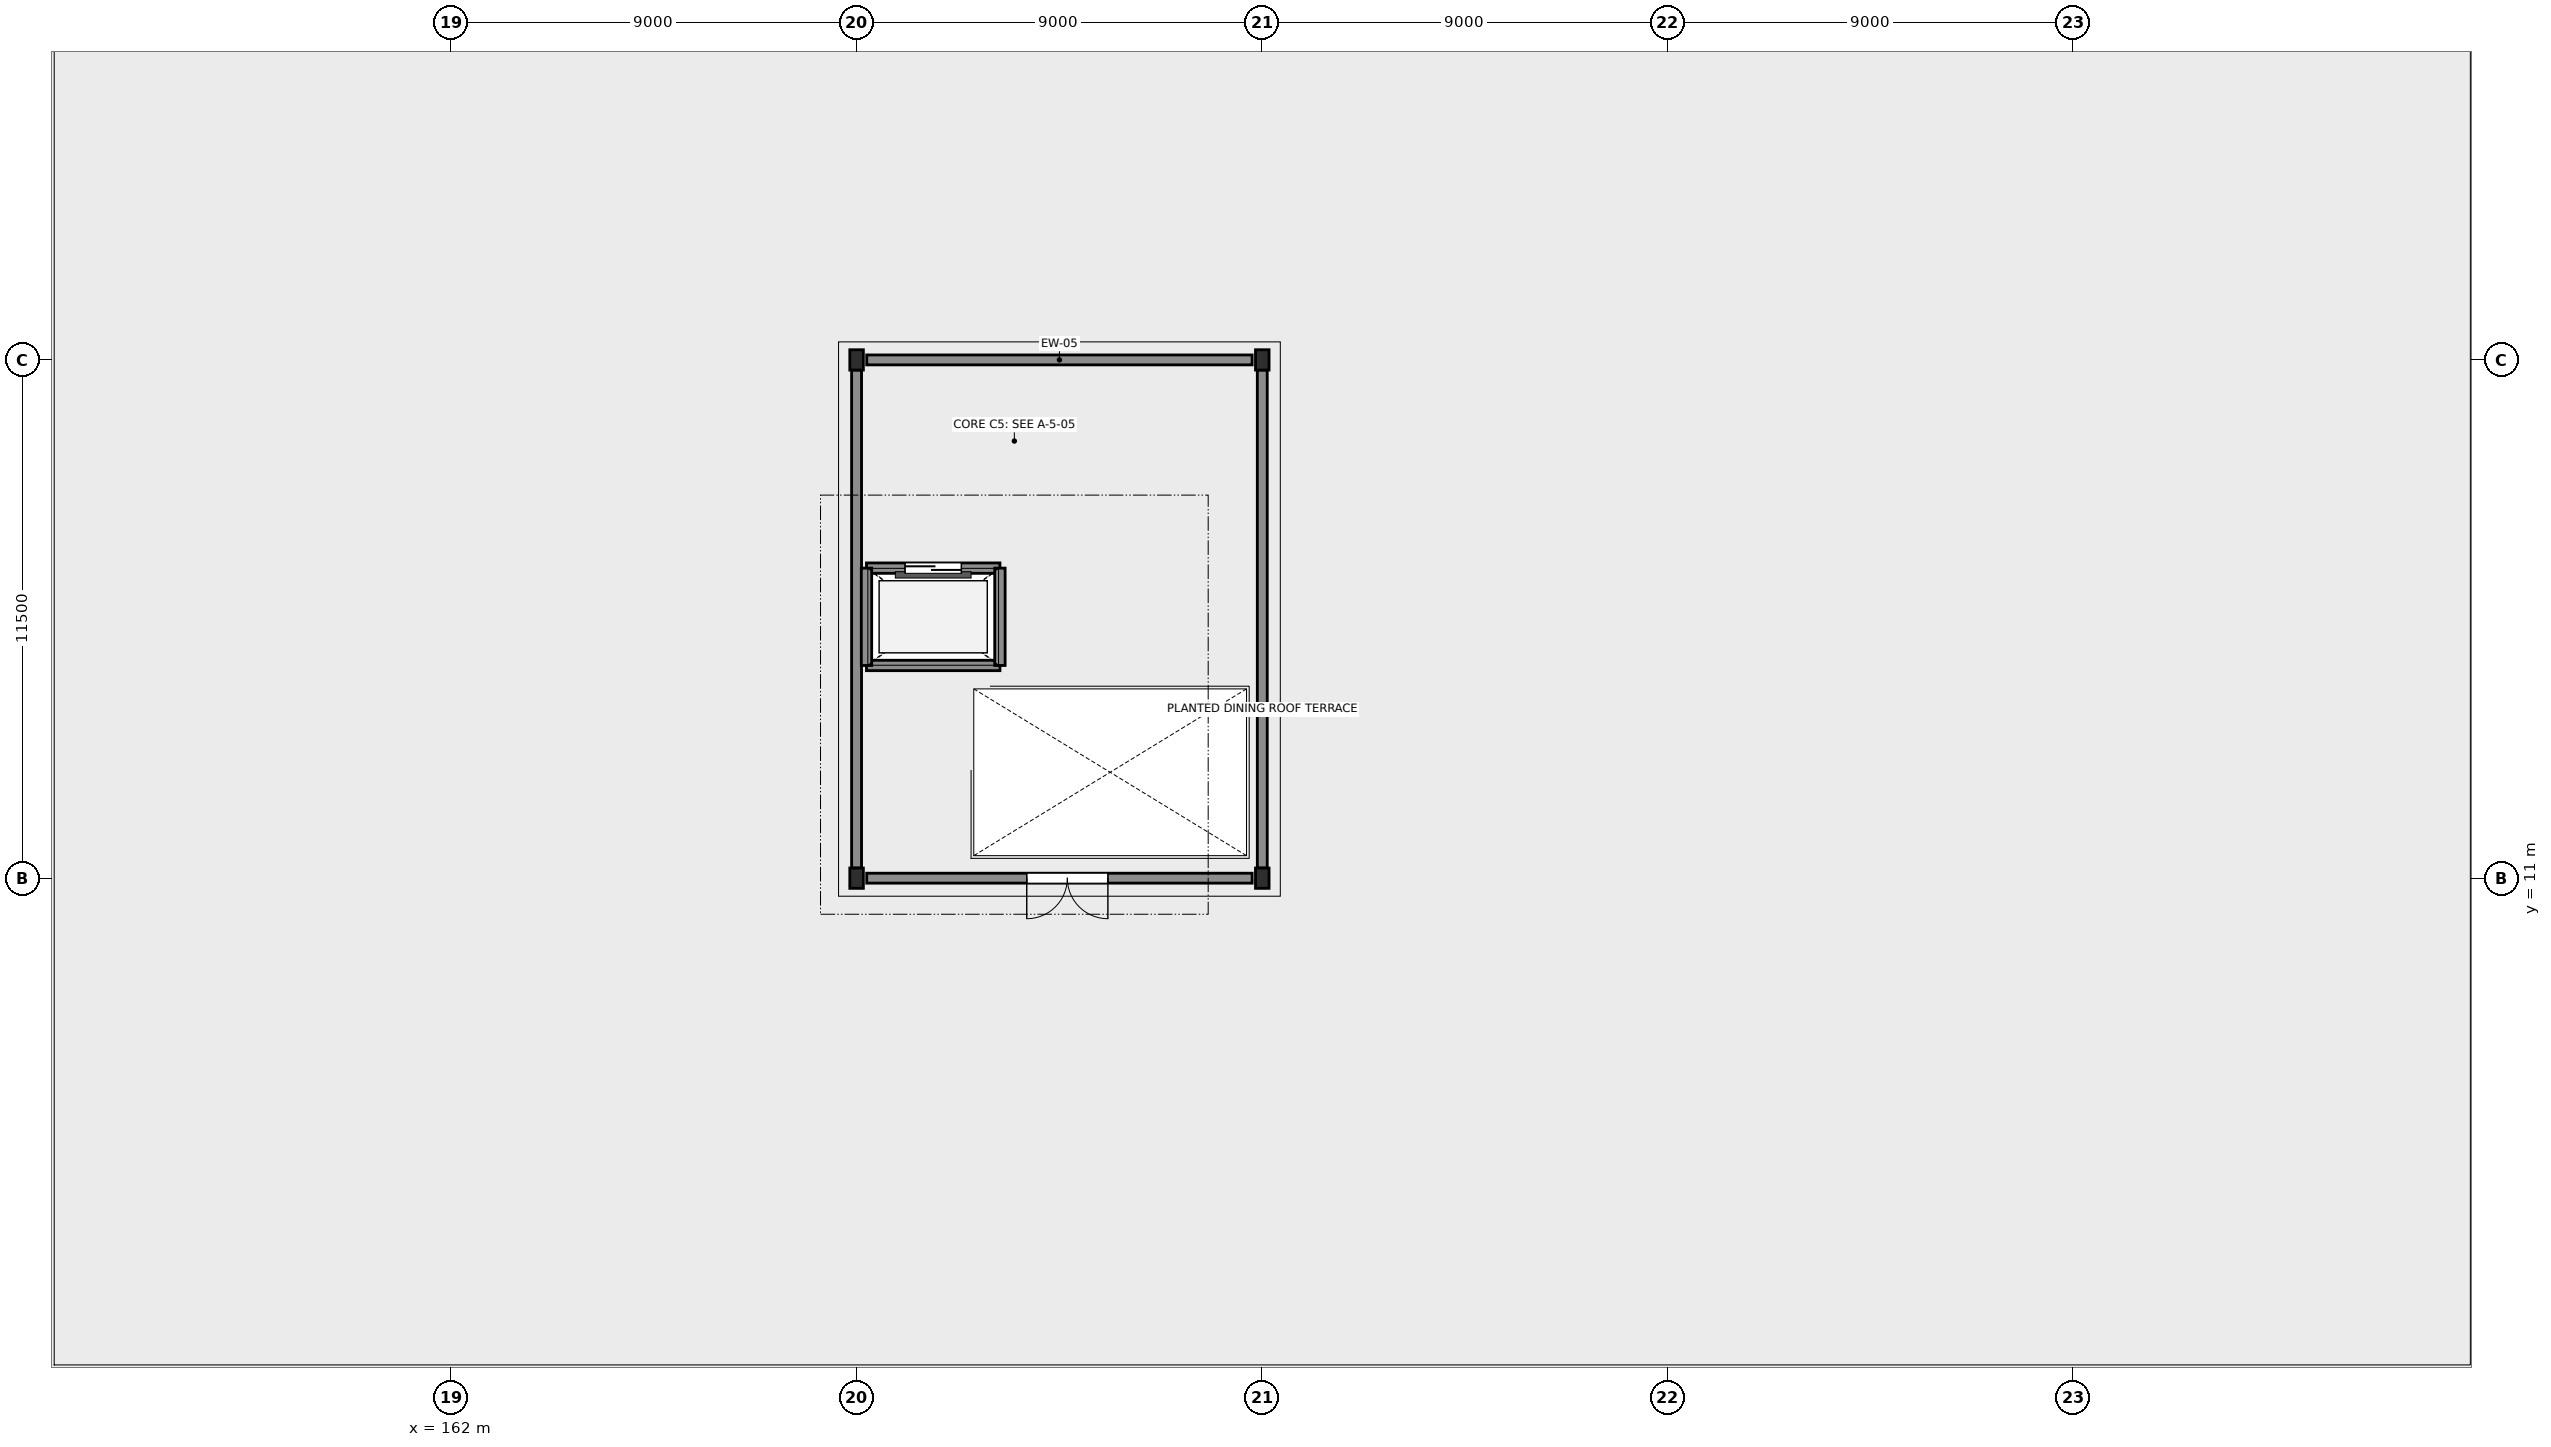
"""IFC4 building model, lengths in metres.
Left out: names, types, materials, properties, quantities, classifications, styles, units other than length and angle.
Written with IfcOpenShell. Run it as: python <this file> out.ifc"""

import sys

from ifc_helpers import new_model, si_unit, direction, frame, frame_2d, origin, origin_2d, place, context, subcontext, project, spatial, rectangle, i_section, extrude, element, fill, save


model = new_model("IFC4")
c1 = context("Model", 3, precision=1e-05, world=origin(), true_north=direction((0.0, 1.0)))
c2 = subcontext(c1, "Body", "Model", "MODEL_VIEW")
j1 = project(units=[si_unit("LENGTHUNIT", "METRE"), si_unit("PLANEANGLEUNIT", "RADIAN")], contexts=[c1])
p1 = place(None, origin())
s1 = spatial("IfcSite", under=j1, at=p1, CompositionType="ELEMENT")
p2 = place(p1, origin())
s2 = spatial("IfcBuilding", under=s1, at=p2, CompositionType="ELEMENT")
p3 = place(p2, frame((0.0, 0.0, 15.0)))
s3 = spatial("IfcBuildingStorey", under=s2, at=p3, CompositionType="ELEMENT", Elevation=15.0)
for number, where, z_axis, x_axis in (
    (1, (171.0, 11.0, 0.0), (0.0, 0.0, 1.0), (1.0, 0.0, 0.0)),
    (2, (171.0, 22.5, 0.0), (0.0, 0.0, 1.0), (1.0, 0.0, 0.0)),
    (3, (180.0, 11.0, 0.0), (0.0, 0.0, 1.0), (1.0, 0.0, 0.0)),
    (4, (180.0, 22.5, 0.0), (0.0, 0.0, 1.0), (1.0, 0.0, 0.0)),
):
    element("IfcColumn", number, at=place(p3, frame(where, z_axis=z_axis, x_axis=x_axis)), inside=s3, PredefinedType="COLUMN", context=c2, shape_type="SweptSolid", body=[
        extrude(i_section(OverallWidth=0.3, OverallDepth=0.45, WebThickness=0.014, FlangeThickness=0.026, FilletRadius=0.027, at=origin_2d()), origin(), (0.0, 0.0, 1.0), 3.4),
    ])
p4 = place(p3, frame((179.775, 11.0, 0.0), z_axis=(0.0, 0.0, 1.0), x_axis=(-1.0, 0.0, 0.0)))
e5 = element("IfcWall", 5, at=p4, inside=s3, PredefinedType="SOLIDWALL", context=c2, shape_type="SweptSolid", body=[
    extrude(rectangle(XDim=8.55, YDim=0.22, at=frame_2d((4.275, 0.0))), origin(), (0.0, 0.0, 1.0), 3.4),
])
p5 = place(p4, frame((3.2, 0.0, 0.0)))
e6 = element("IfcOpeningElement", 6, at=p5, cuts=e5, PredefinedType="OPENING", context=c2, shape_type="SweptSolid", body=[
    extrude(rectangle(XDim=1.8, YDim=2.3, at=frame_2d((0.9, 1.15))), frame((0.0, 0.12, 0.0), z_axis=(0.0, -1.0, 0.0), x_axis=(1.0, 0.0, 0.0)), (0.0, 0.0, 1.0), 0.24),
])
p6 = place(p3, frame((171.0, 11.225, 0.0), z_axis=(0.0, 0.0, 1.0), x_axis=(0.0, 1.0, 0.0)))
e7 = element("IfcWall", 7, at=p6, inside=s3, PredefinedType="SOLIDWALL", context=c2, shape_type="SweptSolid", body=[
    extrude(rectangle(XDim=11.05, YDim=0.22, at=frame_2d((5.525, 0.0))), origin(), (0.0, 0.0, 1.0), 3.4),
])
p7 = place(p3, frame((171.225, 22.5, 0.0), z_axis=(0.0, 0.0, 1.0), x_axis=(1.0, 0.0, 0.0)))
e8 = element("IfcWall", 8, at=p7, inside=s3, PredefinedType="SOLIDWALL", context=c2, shape_type="SweptSolid", body=[
    extrude(rectangle(XDim=8.55, YDim=0.22, at=frame_2d((4.275, 0.0))), origin(), (0.0, 0.0, 1.0), 3.4),
])
p8 = place(p3, frame((180.0, 22.275, 0.0), z_axis=(0.0, 0.0, 1.0), x_axis=(0.0, -1.0, 0.0)))
e9 = element("IfcWall", 9, at=p8, inside=s3, PredefinedType="SOLIDWALL", context=c2, shape_type="SweptSolid", body=[
    extrude(rectangle(XDim=11.05, YDim=0.22, at=frame_2d((5.525, 0.0))), origin(), (0.0, 0.0, 1.0), 3.4),
])
p9 = place(p3, frame((171.22, 17.88, 0.0), z_axis=(0.0, 0.0, 1.0), x_axis=(1.0, 0.0, 0.0)))
e10 = element("IfcWall", 10, at=p9, inside=s3, PredefinedType="SOLIDWALL", context=c2, shape_type="SweptSolid", body=[
    extrude(rectangle(XDim=2.96, YDim=0.23, at=frame_2d((1.48, 0.0))), origin(), (0.0, 0.0, 1.0), 4.26),
])
p10 = place(p9, frame((0.855, 0.0, 0.0)))
e11 = element("IfcOpeningElement", 11, at=p10, cuts=e10, PredefinedType="OPENING", context=c2, shape_type="SweptSolid", body=[
    extrude(rectangle(XDim=1.25, YDim=2.2, at=frame_2d((0.625, 1.1))), frame((0.0, 0.125, 0.0), z_axis=(0.0, -1.0, 0.0), x_axis=(1.0, 0.0, 0.0)), (0.0, 0.0, 1.0), 0.25),
])
p11 = place(p3, frame((174.18, 15.72, 0.0), z_axis=(0.0, 0.0, 1.0), x_axis=(-1.0, 0.0, 0.0)))
e12 = element("IfcWall", 12, at=p11, inside=s3, PredefinedType="SOLIDWALL", context=c2, shape_type="SweptSolid", body=[
    extrude(rectangle(XDim=2.96, YDim=0.23, at=frame_2d((1.48, 0.0))), origin(), (0.0, 0.0, 1.0), 4.26),
])
for number, where, z_axis, x_axis in (
    (13, (171.22, 15.72, 0.0), (0.0, 0.0, 1.0), (0.0, 1.0, 0.0)),
    (14, (174.18, 17.88, 0.0), (0.0, 0.0, 1.0), (0.0, -1.0, 0.0)),
):
    element("IfcWall", number, at=place(p3, frame(where, z_axis=z_axis, x_axis=x_axis)), inside=s3, PredefinedType="SOLIDWALL", context=c2, shape_type="SweptSolid", body=[
        extrude(rectangle(XDim=2.16, YDim=0.23, at=frame_2d((1.08, 0.0))), origin(), (0.0, 0.0, 1.0), 4.26),
    ])
p12 = place(p5, origin())
e15 = element("IfcDoor", 15, at=p12, inside=s3, OperationType="DOUBLE_DOOR_SINGLE_SWING", PredefinedType="DOOR", context=c2, shape_type="SweptSolid", body=[
    extrude(rectangle(XDim=1.8, YDim=2.3, at=frame_2d((0.9, 1.15))), frame((0.0, 0.025, 0.0), z_axis=(0.0, -1.0, 0.0), x_axis=(1.0, 0.0, 0.0)), (0.0, 0.0, 1.0), 0.05),
])
fill(e6, e15)
p13 = place(p10, origin())
e16 = element("IfcDoor", 16, at=p13, inside=s3, OperationType="DOUBLE_DOOR_SLIDING", PredefinedType="DOOR", context=c2, shape_type="SweptSolid", body=[
    extrude(rectangle(XDim=1.25, YDim=2.2, at=frame_2d((0.625, 1.1))), frame((0.0, 0.025, 0.0), z_axis=(0.0, -1.0, 0.0), x_axis=(1.0, 0.0, 0.0)), (0.0, 0.0, 1.0), 0.05),
])
fill(e11, e16)
save(model, sys.argv[1])
